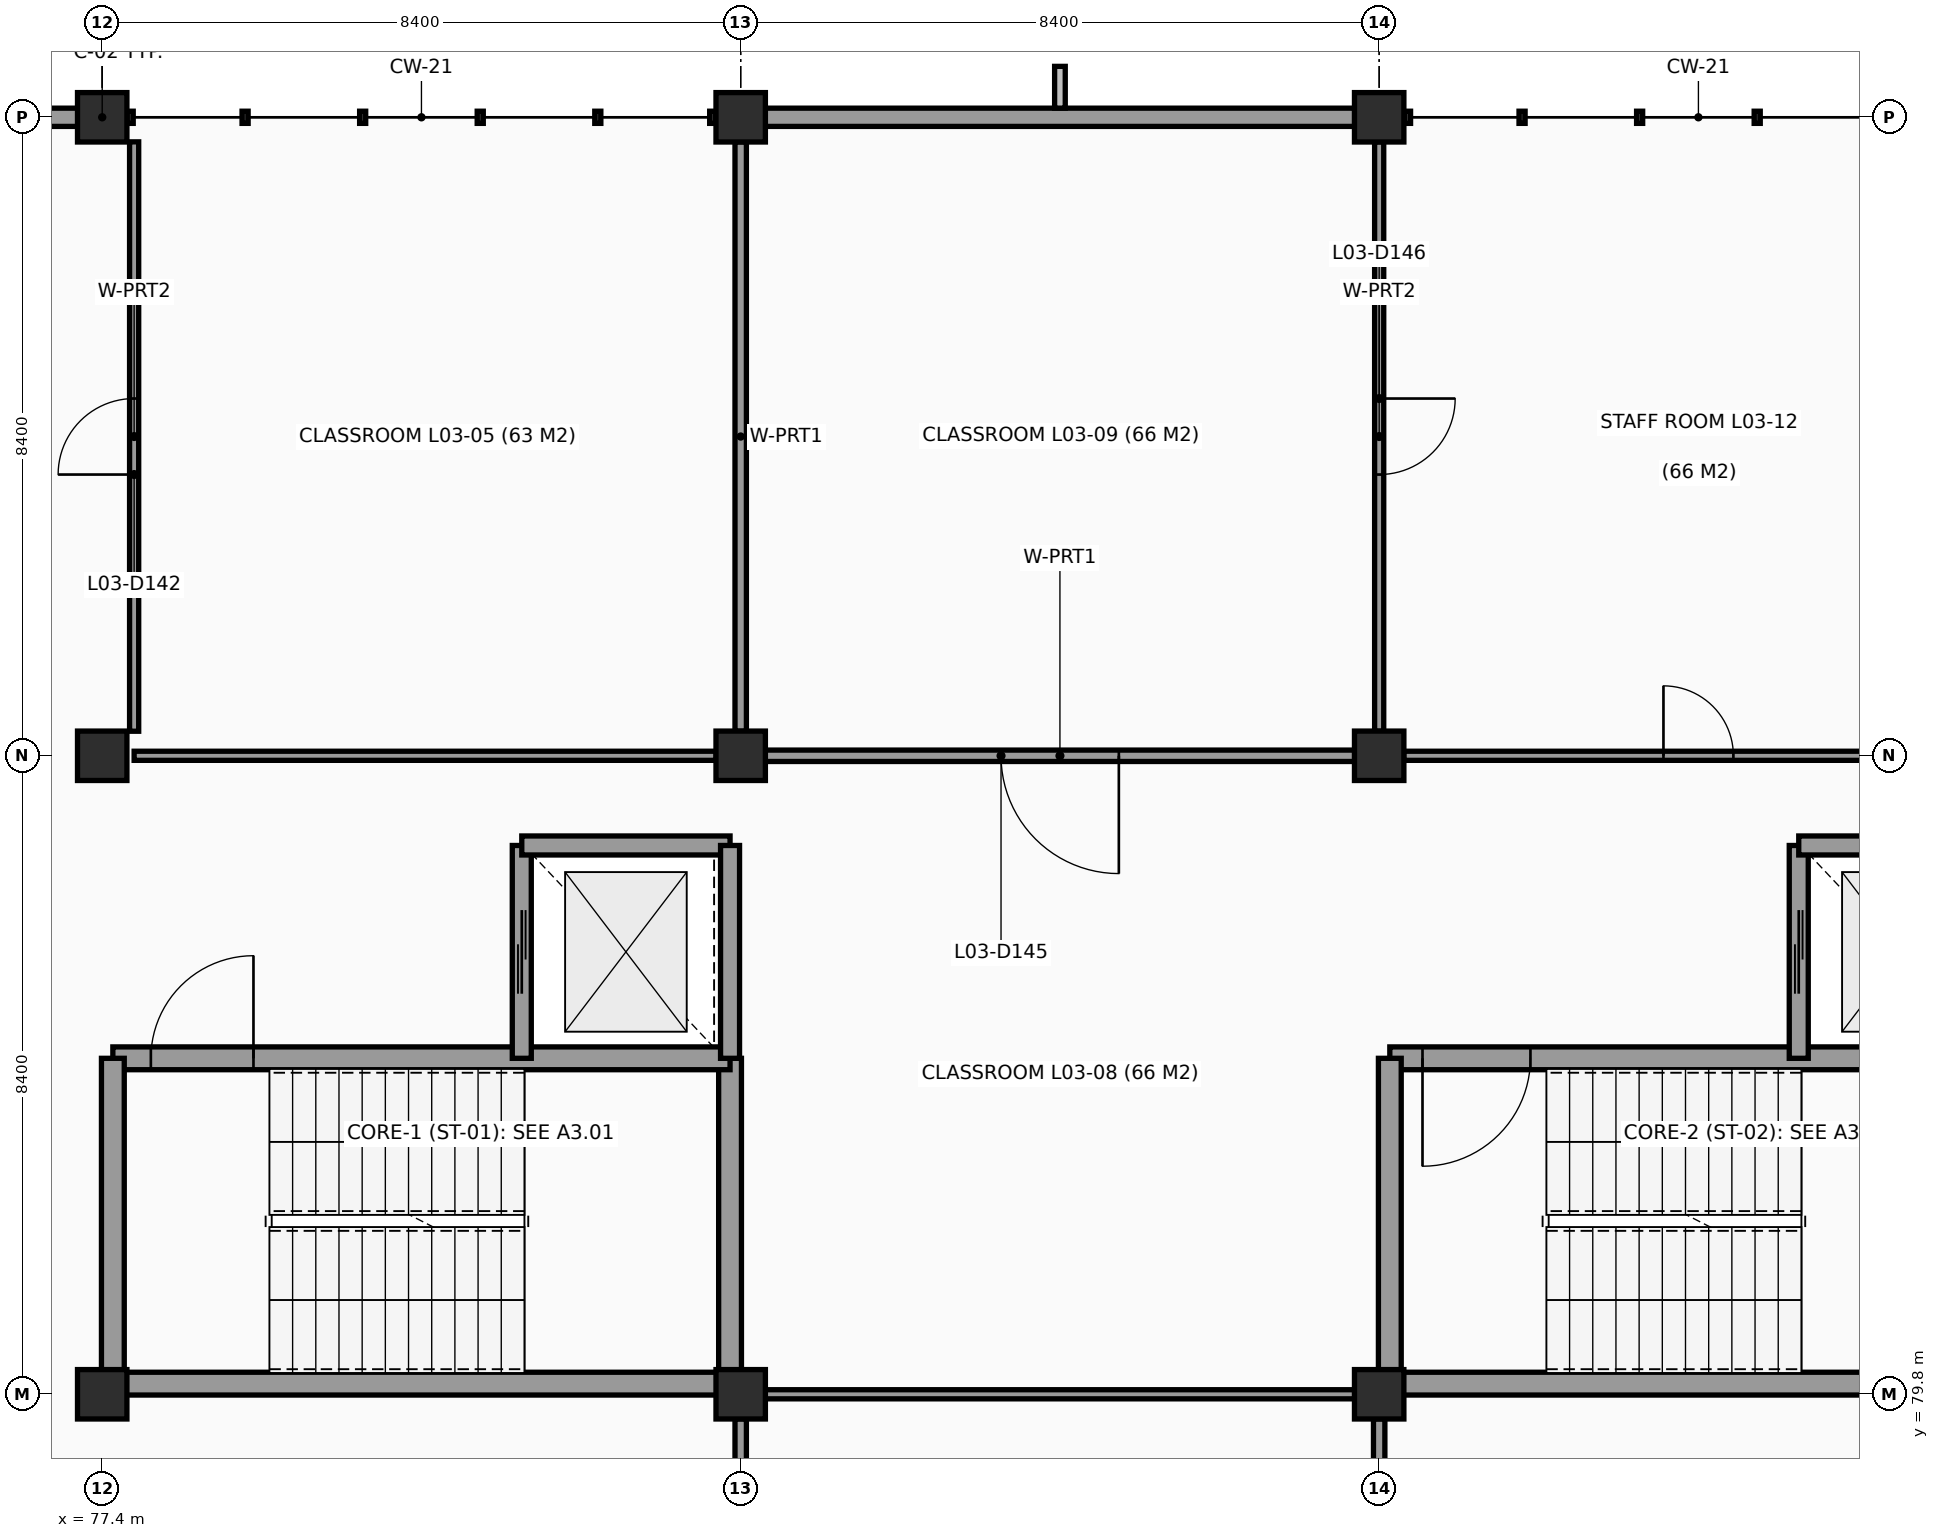
"""IFC4 building model, lengths in metres.
Left out: names, types, materials, properties, quantities, classifications, styles, units other than length and angle.
Written with IfcOpenShell. Run it as: python <this file> out.ifc"""

import sys

from ifc_helpers import new_model, si_unit, direction, frame, frame_2d, origin, origin_2d, place, context, subcontext, project, spatial, rectangle, extrude, element, fill, save


model = new_model("IFC4")
c1 = context("Model", 3, precision=1e-05, world=origin(), true_north=direction((0.0, 1.0)))
c2 = subcontext(c1, "Body", "Model", "MODEL_VIEW")
j1 = project(units=[si_unit("LENGTHUNIT", "METRE"), si_unit("PLANEANGLEUNIT", "RADIAN")], contexts=[c1])
p1 = place(None, origin())
s1 = spatial("IfcSite", under=j1, at=p1, CompositionType="ELEMENT")
p2 = place(p1, origin())
s2 = spatial("IfcBuilding", under=s1, at=p2, CompositionType="ELEMENT")
p3 = place(p2, frame((0.0, 0.0, 11.4)))
s3 = spatial("IfcBuildingStorey", under=s2, at=p3, CompositionType="ELEMENT", Elevation=11.4)
for number, where, z_axis, x_axis in (
    (1, (77.4, 79.8, 0.0), (0.0, 0.0, 1.0), (1.0, 0.0, 0.0)),
    (2, (77.4, 88.2, 0.0), (0.0, 0.0, 1.0), (1.0, 0.0, 0.0)),
    (3, (77.4, 96.6, 0.0), (0.0, 0.0, 1.0), (1.0, 0.0, 0.0)),
    (4, (85.8, 79.8, 0.0), (0.0, 0.0, 1.0), (1.0, 0.0, 0.0)),
    (5, (85.8, 88.2, 0.0), (0.0, 0.0, 1.0), (1.0, 0.0, 0.0)),
    (6, (85.8, 96.6, 0.0), (0.0, 0.0, 1.0), (1.0, 0.0, 0.0)),
    (7, (94.2, 79.8, 0.0), (0.0, 0.0, 1.0), (1.0, 0.0, 0.0)),
    (8, (94.2, 88.2, 0.0), (0.0, 0.0, 1.0), (1.0, 0.0, 0.0)),
    (9, (94.2, 96.6, 0.0), (0.0, 0.0, 1.0), (1.0, 0.0, 0.0)),
):
    element("IfcColumn", number, at=place(p3, frame(where, z_axis=z_axis, x_axis=x_axis)), inside=s3, PredefinedType="COLUMN", context=c2, shape_type="SweptSolid", body=[
        extrude(rectangle(XDim=0.65, YDim=0.65, at=origin_2d()), origin(), (0.0, 0.0, 1.0), 3.6),
    ])
p4 = place(p3, frame((74.673, 96.6, 0.0), z_axis=(0.0, 0.0, 1.0), x_axis=(1.0, 0.0, 0.0)))
e10 = element("IfcWall", 10, at=p4, inside=s3, PredefinedType="SOLIDWALL", context=c2, shape_type="SweptSolid", body=[
    extrude(rectangle(XDim=2.404, YDim=0.24, at=frame_2d((1.202, 0.0))), origin(), (0.0, 0.0, 1.0), 2.64),
])
p5 = place(p3, frame((86.123, 96.6, 0.0), z_axis=(0.0, 0.0, 1.0), x_axis=(1.0, 0.0, 0.0)))
e11 = element("IfcWall", 11, at=p5, inside=s3, PredefinedType="SOLIDWALL", context=c2, shape_type="SweptSolid", body=[
    extrude(rectangle(XDim=7.754, YDim=0.24, at=frame_2d((3.877, 0.0))), origin(), (0.0, 0.0, 1.0), 2.64),
])
p6 = place(p3, frame((77.54, 79.94, 0.0), z_axis=(0.0, 0.0, 1.0), x_axis=(1.0, 0.0, 0.0)))
e12 = element("IfcWall", 12, at=p6, inside=s3, PredefinedType="SHEAR", context=c2, shape_type="SweptSolid", body=[
    extrude(rectangle(XDim=8.12, YDim=0.3, at=frame_2d((4.06, 0.0))), origin(), (0.0, 0.0, 1.0), 3.6),
])
p7 = place(p3, frame((85.66, 79.94, 0.0), z_axis=(0.0, 0.0, 1.0), x_axis=(0.0, 1.0, 0.0)))
e13 = element("IfcWall", 13, at=p7, inside=s3, PredefinedType="SHEAR", context=c2, shape_type="SweptSolid", body=[
    extrude(rectangle(XDim=4.28, YDim=0.3, at=frame_2d((2.14, 0.0))), origin(), (0.0, 0.0, 1.0), 3.6),
])
p8 = place(p3, frame((85.66, 84.22, 0.0), z_axis=(0.0, 0.0, 1.0), x_axis=(-1.0, 0.0, 0.0)))
e14 = element("IfcWall", 14, at=p8, inside=s3, PredefinedType="SHEAR", context=c2, shape_type="SweptSolid", body=[
    extrude(rectangle(XDim=8.12, YDim=0.3, at=frame_2d((4.06, 0.0))), origin(), (0.0, 0.0, 1.0), 3.6),
])
p9 = place(p8, frame((6.27, 0.0, 0.0)))
e15 = element("IfcOpeningElement", 15, at=p9, cuts=e14, PredefinedType="OPENING", context=c2, shape_type="SweptSolid", body=[
    extrude(rectangle(XDim=1.35, YDim=2.15, at=frame_2d((0.675, 1.075))), frame((0.0, 0.16, 0.0), z_axis=(0.0, -1.0, 0.0), x_axis=(1.0, 0.0, 0.0)), (0.0, 0.0, 1.0), 0.32),
])
p10 = place(p3, frame((77.54, 84.22, 0.0), z_axis=(0.0, 0.0, 1.0), x_axis=(0.0, -1.0, 0.0)))
e16 = element("IfcWall", 16, at=p10, inside=s3, PredefinedType="SHEAR", context=c2, shape_type="SweptSolid", body=[
    extrude(rectangle(XDim=4.28, YDim=0.3, at=frame_2d((2.14, 0.0))), origin(), (0.0, 0.0, 1.0), 3.6),
])
p11 = place(p3, frame((82.92, 87.02, 0.0), z_axis=(0.0, 0.0, 1.0), x_axis=(0.0, -1.0, 0.0)))
e17 = element("IfcWall", 17, at=p11, inside=s3, PredefinedType="SHEAR", context=c2, shape_type="SweptSolid", body=[
    extrude(rectangle(XDim=2.8, YDim=0.25, at=frame_2d((1.4, 0.0))), origin(), (0.0, 0.0, 1.0), 3.6),
])
p12 = place(p11, frame((0.85, 0.0, 0.0)))
e18 = element("IfcOpeningElement", 18, at=p12, cuts=e17, PredefinedType="OPENING", context=c2, shape_type="SweptSolid", body=[
    extrude(rectangle(XDim=1.1, YDim=2.15, at=frame_2d((0.55, 1.075))), frame((0.0, 0.135, 0.0), z_axis=(0.0, -1.0, 0.0), x_axis=(1.0, 0.0, 0.0)), (0.0, 0.0, 1.0), 0.27),
])
p13 = place(p3, frame((85.66, 87.02, 0.0), z_axis=(0.0, 0.0, 1.0), x_axis=(-1.0, 0.0, 0.0)))
e19 = element("IfcWall", 19, at=p13, inside=s3, PredefinedType="SHEAR", context=c2, shape_type="SweptSolid", body=[
    extrude(rectangle(XDim=2.74, YDim=0.25, at=frame_2d((1.37, 0.0))), origin(), (0.0, 0.0, 1.0), 3.6),
])
p14 = place(p3, frame((85.66, 84.22, 0.0), z_axis=(0.0, 0.0, 1.0), x_axis=(0.0, 1.0, 0.0)))
e20 = element("IfcWall", 20, at=p14, inside=s3, PredefinedType="SHEAR", context=c2, shape_type="SweptSolid", body=[
    extrude(rectangle(XDim=2.8, YDim=0.25, at=frame_2d((1.4, 0.0))), origin(), (0.0, 0.0, 1.0), 3.6),
])
p15 = place(p3, frame((94.34, 79.94, 0.0), z_axis=(0.0, 0.0, 1.0), x_axis=(1.0, 0.0, 0.0)))
e21 = element("IfcWall", 21, at=p15, inside=s3, PredefinedType="SHEAR", context=c2, shape_type="SweptSolid", body=[
    extrude(rectangle(XDim=8.12, YDim=0.3, at=frame_2d((4.06, 0.0))), origin(), (0.0, 0.0, 1.0), 3.6),
])
p16 = place(p3, frame((102.46, 84.22, 0.0), z_axis=(0.0, 0.0, 1.0), x_axis=(-1.0, 0.0, 0.0)))
e22 = element("IfcWall", 22, at=p16, inside=s3, PredefinedType="SHEAR", context=c2, shape_type="SweptSolid", body=[
    extrude(rectangle(XDim=8.12, YDim=0.3, at=frame_2d((4.06, 0.0))), origin(), (0.0, 0.0, 1.0), 3.6),
])
p17 = place(p16, frame((6.27, 0.0, 0.0)))
e23 = element("IfcOpeningElement", 23, at=p17, cuts=e22, PredefinedType="OPENING", context=c2, shape_type="SweptSolid", body=[
    extrude(rectangle(XDim=1.42, YDim=2.15, at=frame_2d((0.71, 1.075))), frame((0.0, 0.16, 0.0), z_axis=(0.0, -1.0, 0.0), x_axis=(1.0, 0.0, 0.0)), (0.0, 0.0, 1.0), 0.32),
])
p18 = place(p3, frame((94.34, 84.22, 0.0), z_axis=(0.0, 0.0, 1.0), x_axis=(0.0, -1.0, 0.0)))
e24 = element("IfcWall", 24, at=p18, inside=s3, PredefinedType="SHEAR", context=c2, shape_type="SweptSolid", body=[
    extrude(rectangle(XDim=4.28, YDim=0.3, at=frame_2d((2.14, 0.0))), origin(), (0.0, 0.0, 1.0), 3.6),
])
p19 = place(p3, frame((99.72, 87.02, 0.0), z_axis=(0.0, 0.0, 1.0), x_axis=(0.0, -1.0, 0.0)))
e25 = element("IfcWall", 25, at=p19, inside=s3, PredefinedType="SHEAR", context=c2, shape_type="SweptSolid", body=[
    extrude(rectangle(XDim=2.8, YDim=0.25, at=frame_2d((1.4, 0.0))), origin(), (0.0, 0.0, 1.0), 3.6),
])
p20 = place(p19, frame((0.85, 0.0, 0.0)))
e26 = element("IfcOpeningElement", 26, at=p20, cuts=e25, PredefinedType="OPENING", context=c2, shape_type="SweptSolid", body=[
    extrude(rectangle(XDim=1.1, YDim=2.15, at=frame_2d((0.55, 1.075))), frame((0.0, 0.135, 0.0), z_axis=(0.0, -1.0, 0.0), x_axis=(1.0, 0.0, 0.0)), (0.0, 0.0, 1.0), 0.27),
])
p21 = place(p3, frame((102.46, 87.02, 0.0), z_axis=(0.0, 0.0, 1.0), x_axis=(-1.0, 0.0, 0.0)))
e27 = element("IfcWall", 27, at=p21, inside=s3, PredefinedType="SHEAR", context=c2, shape_type="SweptSolid", body=[
    extrude(rectangle(XDim=2.74, YDim=0.25, at=frame_2d((1.37, 0.0))), origin(), (0.0, 0.0, 1.0), 3.6),
])
p22 = place(p3, frame((77.82, 88.523, 0.0), z_axis=(0.0, 0.0, 1.0), x_axis=(0.0, 1.0, 0.0)))
e28 = element("IfcWall", 28, at=p22, inside=s3, PredefinedType="PARTITIONING", context=c2, shape_type="SweptSolid", body=[
    extrude(rectangle(XDim=7.754, YDim=0.12, at=frame_2d((3.877, 0.0))), origin(), (0.0, 0.0, 1.0), 3.01),
])
p23 = place(p22, frame((3.377, 0.0, 0.0)))
e29 = element("IfcOpeningElement", 29, at=p23, cuts=e28, PredefinedType="OPENING", context=c2, shape_type="SweptSolid", body=[
    extrude(rectangle(XDim=1.0, YDim=2.1, at=frame_2d((0.5, 1.05))), frame((0.0, 0.07, 0.0), z_axis=(0.0, -1.0, 0.0), x_axis=(1.0, 0.0, 0.0)), (0.0, 0.0, 1.0), 0.14),
])
p24 = place(p3, frame((85.8, 96.277, 0.0), z_axis=(0.0, 0.0, 1.0), x_axis=(0.0, -1.0, 0.0)))
e30 = element("IfcWall", 30, at=p24, inside=s3, PredefinedType="PARTITIONING", context=c2, shape_type="SweptSolid", body=[
    extrude(rectangle(XDim=7.754, YDim=0.15, at=frame_2d((3.877, 0.0))), origin(), (0.0, 0.0, 1.0), 2.69),
])
p25 = place(p3, frame((85.477, 88.2, 0.0), z_axis=(0.0, 0.0, 1.0), x_axis=(-1.0, 0.0, 0.0)))
e31 = element("IfcWall", 31, at=p25, inside=s3, PredefinedType="PARTITIONING", context=c2, shape_type="SweptSolid", body=[
    extrude(rectangle(XDim=7.657, YDim=0.12, at=frame_2d((3.829, 0.0))), origin(), (0.0, 0.0, 1.0), 2.69),
])
p26 = place(p3, frame((85.8, 73.82, 0.0), z_axis=(0.0, 0.0, 1.0), x_axis=(0.0, 1.0, 0.0)))
e32 = element("IfcWall", 32, at=p26, inside=s3, PredefinedType="PARTITIONING", context=c2, shape_type="SweptSolid", body=[
    extrude(rectangle(XDim=5.657, YDim=0.15, at=frame_2d((2.829, 0.0))), origin(), (0.0, 0.0, 1.0), 2.69),
])
p27 = place(p26, frame((2.229, 0.0, 0.0)))
e33 = element("IfcOpeningElement", 33, at=p27, cuts=e32, PredefinedType="OPENING", context=c2, shape_type="SweptSolid", body=[
    extrude(rectangle(XDim=1.2, YDim=2.15, at=frame_2d((0.6, 1.075))), frame((0.0, 0.085, 0.0), z_axis=(0.0, -1.0, 0.0), x_axis=(1.0, 0.0, 0.0)), (0.0, 0.0, 1.0), 0.17),
])
p28 = place(p3, frame((86.123, 79.8, 0.0), z_axis=(0.0, 0.0, 1.0), x_axis=(1.0, 0.0, 0.0)))
e34 = element("IfcWall", 34, at=p28, inside=s3, PredefinedType="PARTITIONING", context=c2, shape_type="SweptSolid", body=[
    extrude(rectangle(XDim=7.754, YDim=0.12, at=frame_2d((3.877, 0.0))), origin(), (0.0, 0.0, 1.0), 2.59),
])
p29 = place(p3, frame((94.2, 79.477, 0.0), z_axis=(0.0, 0.0, 1.0), x_axis=(0.0, -1.0, 0.0)))
e35 = element("IfcWall", 35, at=p29, inside=s3, PredefinedType="PARTITIONING", context=c2, shape_type="SweptSolid", body=[
    extrude(rectangle(XDim=5.657, YDim=0.15, at=frame_2d((2.829, 0.0))), origin(), (0.0, 0.0, 1.0), 2.74),
])
p30 = place(p3, frame((86.123, 88.2, 0.0), z_axis=(0.0, 0.0, 1.0), x_axis=(1.0, 0.0, 0.0)))
e36 = element("IfcWall", 36, at=p30, inside=s3, PredefinedType="PARTITIONING", context=c2, shape_type="SweptSolid", body=[
    extrude(rectangle(XDim=7.754, YDim=0.15, at=frame_2d((3.877, 0.0))), origin(), (0.0, 0.0, 1.0), 2.69),
])
p31 = place(p30, frame((3.102, 0.0, 0.0)))
e37 = element("IfcOpeningElement", 37, at=p31, cuts=e36, PredefinedType="OPENING", context=c2, shape_type="SweptSolid", body=[
    extrude(rectangle(XDim=1.55, YDim=2.2, at=frame_2d((0.775, 1.1))), frame((0.0, 0.085, 0.0), z_axis=(0.0, -1.0, 0.0), x_axis=(1.0, 0.0, 0.0)), (0.0, 0.0, 1.0), 0.17),
])
p32 = place(p3, frame((94.2, 96.277, 0.0), z_axis=(0.0, 0.0, 1.0), x_axis=(0.0, -1.0, 0.0)))
e38 = element("IfcWall", 38, at=p32, inside=s3, PredefinedType="PARTITIONING", context=c2, shape_type="SweptSolid", body=[
    extrude(rectangle(XDim=7.754, YDim=0.12, at=frame_2d((3.877, 0.0))), origin(), (0.0, 0.0, 1.0), 2.74),
])
p33 = place(p32, frame((3.377, 0.0, 0.0)))
e39 = element("IfcOpeningElement", 39, at=p33, cuts=e38, PredefinedType="OPENING", context=c2, shape_type="SweptSolid", body=[
    extrude(rectangle(XDim=1.0, YDim=2.1, at=frame_2d((0.5, 1.05))), frame((0.0, 0.07, 0.0), z_axis=(0.0, -1.0, 0.0), x_axis=(1.0, 0.0, 0.0)), (0.0, 0.0, 1.0), 0.14),
])
p34 = place(p3, frame((102.277, 88.2, 0.0), z_axis=(0.0, 0.0, 1.0), x_axis=(-1.0, 0.0, 0.0)))
e40 = element("IfcWall", 40, at=p34, inside=s3, PredefinedType="PARTITIONING", context=c2, shape_type="SweptSolid", body=[
    extrude(rectangle(XDim=7.754, YDim=0.12, at=frame_2d((3.877, 0.0))), origin(), (0.0, 0.0, 1.0), 2.69),
])
p35 = place(p34, frame((3.417, 0.0, 0.0)))
e41 = element("IfcOpeningElement", 41, at=p35, cuts=e40, PredefinedType="OPENING", context=c2, shape_type="SweptSolid", body=[
    extrude(rectangle(XDim=0.92, YDim=2.1, at=frame_2d((0.46, 1.05))), frame((0.0, 0.07, 0.0), z_axis=(0.0, -1.0, 0.0), x_axis=(1.0, 0.0, 0.0)), (0.0, 0.0, 1.0), 0.14),
])
p36 = place(p9, frame((1.35, 0.0, 0.0), z_axis=(0.0, 0.0, 1.0), x_axis=(-1.0, 0.0, 0.0)))
e42 = element("IfcDoor", 42, at=p36, inside=s3, OperationType="SINGLE_SWING_LEFT", PredefinedType="DOOR", context=c2, shape_type="SweptSolid", body=[
    extrude(rectangle(XDim=1.35, YDim=2.15, at=frame_2d((0.675, 1.075))), frame((0.0, 0.025, 0.0), z_axis=(0.0, -1.0, 0.0), x_axis=(1.0, 0.0, 0.0)), (0.0, 0.0, 1.0), 0.05),
])
fill(e15, e42)
p37 = place(p12, origin())
e43 = element("IfcDoor", 43, at=p37, inside=s3, OperationType="DOUBLE_DOOR_SLIDING", PredefinedType="DOOR", context=c2, shape_type="SweptSolid", body=[
    extrude(rectangle(XDim=1.1, YDim=2.15, at=frame_2d((0.55, 1.075))), frame((0.0, 0.025, 0.0), z_axis=(0.0, -1.0, 0.0), x_axis=(1.0, 0.0, 0.0)), (0.0, 0.0, 1.0), 0.05),
])
fill(e18, e43)
p38 = place(p17, frame((1.42, 0.0, 0.0), z_axis=(0.0, 0.0, 1.0), x_axis=(-1.0, 0.0, 0.0)))
e44 = element("IfcDoor", 44, at=p38, inside=s3, OperationType="SINGLE_SWING_RIGHT", PredefinedType="DOOR", context=c2, shape_type="SweptSolid", body=[
    extrude(rectangle(XDim=1.42, YDim=2.15, at=frame_2d((0.71, 1.075))), frame((0.0, 0.025, 0.0), z_axis=(0.0, -1.0, 0.0), x_axis=(1.0, 0.0, 0.0)), (0.0, 0.0, 1.0), 0.05),
])
fill(e23, e44)
p39 = place(p20, origin())
e45 = element("IfcDoor", 45, at=p39, inside=s3, OperationType="DOUBLE_DOOR_SLIDING", PredefinedType="DOOR", context=c2, shape_type="SweptSolid", body=[
    extrude(rectangle(XDim=1.1, YDim=2.15, at=frame_2d((0.55, 1.075))), frame((0.0, 0.025, 0.0), z_axis=(0.0, -1.0, 0.0), x_axis=(1.0, 0.0, 0.0)), (0.0, 0.0, 1.0), 0.05),
])
fill(e26, e45)
p40 = place(p23, origin())
e46 = element("IfcDoor", 46, at=p40, inside=s3, OperationType="SINGLE_SWING_LEFT", PredefinedType="DOOR", context=c2, shape_type="SweptSolid", body=[
    extrude(rectangle(XDim=1.0, YDim=2.1, at=frame_2d((0.5, 1.05))), frame((0.0, 0.025, 0.0), z_axis=(0.0, -1.0, 0.0), x_axis=(1.0, 0.0, 0.0)), (0.0, 0.0, 1.0), 0.05),
])
fill(e29, e46)
p41 = place(p31, origin())
e47 = element("IfcDoor", 47, at=p41, inside=s3, OperationType="DOUBLE_DOOR_SINGLE_SWING", PredefinedType="DOOR", context=c2, shape_type="SweptSolid", body=[
    extrude(rectangle(XDim=1.55, YDim=2.2, at=frame_2d((0.775, 1.1))), frame((0.0, 0.025, 0.0), z_axis=(0.0, -1.0, 0.0), x_axis=(1.0, 0.0, 0.0)), (0.0, 0.0, 1.0), 0.05),
])
fill(e37, e47)
p42 = place(p33, origin())
e48 = element("IfcDoor", 48, at=p42, inside=s3, OperationType="SINGLE_SWING_LEFT", PredefinedType="DOOR", context=c2, shape_type="SweptSolid", body=[
    extrude(rectangle(XDim=1.0, YDim=2.1, at=frame_2d((0.5, 1.05))), frame((0.0, 0.025, 0.0), z_axis=(0.0, -1.0, 0.0), x_axis=(1.0, 0.0, 0.0)), (0.0, 0.0, 1.0), 0.05),
])
fill(e39, e48)
p43 = place(p35, origin())
e49 = element("IfcDoor", 49, at=p43, inside=s3, OperationType="SINGLE_SWING_RIGHT", PredefinedType="DOOR", context=c2, shape_type="SweptSolid", body=[
    extrude(rectangle(XDim=0.92, YDim=2.1, at=frame_2d((0.46, 1.05))), frame((0.0, 0.025, 0.0), z_axis=(0.0, -1.0, 0.0), x_axis=(1.0, 0.0, 0.0)), (0.0, 0.0, 1.0), 0.05),
])
fill(e41, e49)
save(model, sys.argv[1])
